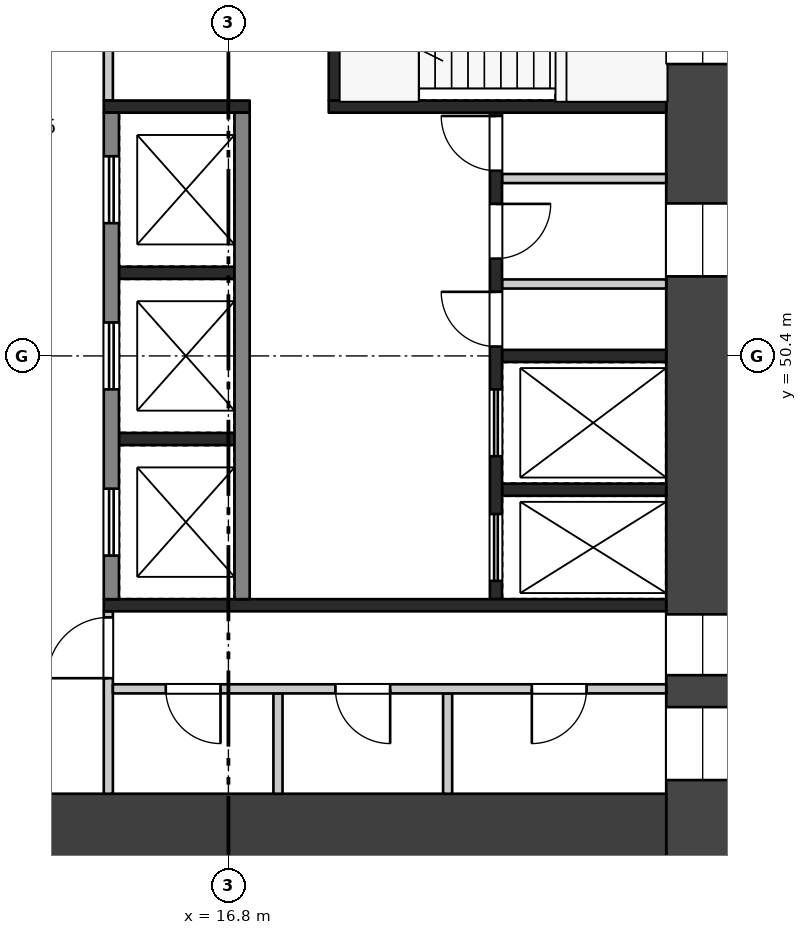
"""IFC4 building model, lengths in metres.
Left out: names, types, materials, properties, quantities, classifications, styles, units other than length and angle.
Written with IfcOpenShell. Run it as: python <this file> out.ifc"""

import sys

from ifc_helpers import new_model, si_unit, direction, frame, frame_2d, origin, place, context, subcontext, project, spatial, rectangle, extrude, element, fill, save


model = new_model("IFC4")
c1 = context("Model", 3, precision=1e-05, world=origin(), true_north=direction((0.0, 1.0)))
c2 = subcontext(c1, "Body", "Model", "MODEL_VIEW")
j1 = project(units=[si_unit("LENGTHUNIT", "METRE"), si_unit("PLANEANGLEUNIT", "RADIAN")], contexts=[c1])
p1 = place(None, origin())
s1 = spatial("IfcSite", under=j1, at=p1, CompositionType="ELEMENT")
p2 = place(p1, origin())
s2 = spatial("IfcBuilding", under=s1, at=p2, CompositionType="ELEMENT")
p3 = place(p2, frame((0.0, 0.0, 207.2)))
s3 = spatial("IfcBuildingStorey", under=s2, at=p3, CompositionType="ELEMENT", Elevation=207.2)
p4 = place(p3, frame((24.6, 58.8, 0.0), z_axis=(0.0, 0.0, 1.0), x_axis=(0.0, -1.0, 0.0)))
e1 = element("IfcWall", 1, at=p4, inside=s3, PredefinedType="SHEAR", context=c2, shape_type="SweptSolid", body=[
    extrude(rectangle(XDim=16.8, YDim=1.2, at=frame_2d((8.4, 0.0))), origin(), (0.0, 0.0, 1.0), 6.72),
])
p5 = place(p4, frame((1.8, 0.0, 0.5)))
e2 = element("IfcOpeningElement", 2, at=p5, cuts=e1, PredefinedType="OPENING", context=c2, shape_type="SweptSolid", body=[
    extrude(rectangle(XDim=1.8, YDim=2.4, at=frame_2d((0.9, 1.2))), frame((0.0, 0.61, 0.0), z_axis=(0.0, -1.0, 0.0), x_axis=(1.0, 0.0, 0.0)), (0.0, 0.0, 1.0), 1.22),
])
p6 = place(p4, frame((5.892, 0.0, 1.6)))
e3 = element("IfcOpeningElement", 3, at=p6, cuts=e1, PredefinedType="OPENING", context=c2, shape_type="SweptSolid", body=[
    extrude(rectangle(XDim=1.2, YDim=1.2, at=frame_2d((0.6, 0.6))), frame((0.0, 0.61, 0.0), z_axis=(0.0, -1.0, 0.0), x_axis=(1.0, 0.0, 0.0)), (0.0, 0.0, 1.0), 1.22),
])
p7 = place(p4, frame((12.65, 0.0, 0.6)))
e4 = element("IfcOpeningElement", 4, at=p7, cuts=e1, PredefinedType="OPENING", context=c2, shape_type="SweptSolid", body=[
    extrude(rectangle(XDim=1.0, YDim=2.1, at=frame_2d((0.5, 1.05))), frame((0.0, 0.61, 0.0), z_axis=(0.0, -1.0, 0.0), x_axis=(1.0, 0.0, 0.0)), (0.0, 0.0, 1.0), 1.22),
])
p8 = place(p4, frame((14.175, 0.0, 1.6)))
e5 = element("IfcOpeningElement", 5, at=p8, cuts=e1, PredefinedType="OPENING", context=c2, shape_type="SweptSolid", body=[
    extrude(rectangle(XDim=1.2, YDim=1.2, at=frame_2d((0.6, 0.6))), frame((0.0, 0.61, 0.0), z_axis=(0.0, -1.0, 0.0), x_axis=(1.0, 0.0, 0.0)), (0.0, 0.0, 1.0), 1.22),
])
p9 = place(p3, frame((9.6, 42.6, 0.0), z_axis=(0.0, 0.0, 1.0), x_axis=(1.0, 0.0, 0.0)))
e6 = element("IfcWall", 6, at=p9, inside=s3, PredefinedType="SHEAR", context=c2, shape_type="SweptSolid", body=[
    extrude(rectangle(XDim=14.4, YDim=1.2, at=frame_2d((7.2, 0.0))), origin(), (0.0, 0.0, 1.0), 6.72),
])
p10 = place(p9, frame((2.1, 0.0, 0.0)))
e7 = element("IfcOpeningElement", 7, at=p10, cuts=e6, PredefinedType="OPENING", context=c2, shape_type="SweptSolid", body=[
    extrude(rectangle(XDim=1.8, YDim=2.1, at=frame_2d((0.9, 1.05))), frame((0.0, 0.61, 0.0), z_axis=(0.0, -1.0, 0.0), x_axis=(1.0, 0.0, 0.0)), (0.0, 0.0, 1.0), 1.22),
])
for number, where, z_axis, x_axis in (
    (8, (15.0, 51.767, 0.0), (0.0, 0.0, 1.0), (1.0, 0.0, 0.0)),
    (9, (15.0, 49.033, 0.0), (0.0, 0.0, 1.0), (1.0, 0.0, 0.0)),
):
    element("IfcWall", number, at=place(p3, frame(where, z_axis=z_axis, x_axis=x_axis)), inside=s3, PredefinedType="SHEAR", context=c2, shape_type="SweptSolid", body=[
        extrude(rectangle(XDim=1.9, YDim=0.2, at=frame_2d((0.95, 0.0))), origin(), (0.0, 0.0, 1.0), 6.72),
    ])
p11 = place(p3, frame((14.875, 54.4, 0.0), z_axis=(0.0, 0.0, 1.0), x_axis=(0.0, -1.0, 0.0)))
e10 = element("IfcWall", 10, at=p11, inside=s3, PredefinedType="SHEAR", context=c2, shape_type="SweptSolid", body=[
    extrude(rectangle(XDim=8.0, YDim=0.25, at=frame_2d((4.0, 0.0))), origin(), (0.0, 0.0, 1.0), 6.72),
])
p12 = place(p11, frame((0.717, 0.0, 0.0)))
e11 = element("IfcOpeningElement", 11, at=p12, cuts=e10, PredefinedType="OPENING", context=c2, shape_type="SweptSolid", body=[
    extrude(rectangle(XDim=1.1, YDim=2.1, at=frame_2d((0.55, 1.05))), frame((0.0, 0.135, 0.0), z_axis=(0.0, -1.0, 0.0), x_axis=(1.0, 0.0, 0.0)), (0.0, 0.0, 1.0), 0.27),
])
p13 = place(p11, frame((3.45, 0.0, 0.0)))
e12 = element("IfcOpeningElement", 12, at=p13, cuts=e10, PredefinedType="OPENING", context=c2, shape_type="SweptSolid", body=[
    extrude(rectangle(XDim=1.1, YDim=2.1, at=frame_2d((0.55, 1.05))), frame((0.0, 0.135, 0.0), z_axis=(0.0, -1.0, 0.0), x_axis=(1.0, 0.0, 0.0)), (0.0, 0.0, 1.0), 0.27),
])
p14 = place(p11, frame((6.183, 0.0, 0.0)))
e13 = element("IfcOpeningElement", 13, at=p14, cuts=e10, PredefinedType="OPENING", context=c2, shape_type="SweptSolid", body=[
    extrude(rectangle(XDim=1.1, YDim=2.1, at=frame_2d((0.55, 1.05))), frame((0.0, 0.135, 0.0), z_axis=(0.0, -1.0, 0.0), x_axis=(1.0, 0.0, 0.0)), (0.0, 0.0, 1.0), 0.27),
])
p15 = place(p3, frame((17.025, 54.4, 0.0), z_axis=(0.0, 0.0, 1.0), x_axis=(0.0, -1.0, 0.0)))
e14 = element("IfcWall", 14, at=p15, inside=s3, PredefinedType="SHEAR", context=c2, shape_type="SweptSolid", body=[
    extrude(rectangle(XDim=8.0, YDim=0.25, at=frame_2d((4.0, 0.0))), origin(), (0.0, 0.0, 1.0), 6.72),
])
for number, where, z_axis, x_axis in (
    (15, (21.3, 50.4, 0.0), (0.0, 0.0, 1.0), (1.0, 0.0, 0.0)),
    (16, (21.3, 48.2, 0.0), (0.0, 0.0, 1.0), (1.0, 0.0, 0.0)),
):
    element("IfcWall", number, at=place(p3, frame(where, z_axis=z_axis, x_axis=x_axis)), inside=s3, PredefinedType="SHEAR", context=c2, shape_type="SweptSolid", body=[
        extrude(rectangle(XDim=2.7, YDim=0.2, at=frame_2d((1.35, 0.0))), origin(), (0.0, 0.0, 1.0), 6.72),
    ])
for number, where, z_axis, x_axis in (
    (17, (21.3, 53.317, 0.0), (0.0, 0.0, 1.0), (1.0, 0.0, 0.0)),
    (18, (21.3, 51.583, 0.0), (0.0, 0.0, 1.0), (1.0, 0.0, 0.0)),
):
    element("IfcWall", number, at=place(p3, frame(where, z_axis=z_axis, x_axis=x_axis)), inside=s3, PredefinedType="PARTITIONING", context=c2, shape_type="SweptSolid", body=[
        extrude(rectangle(XDim=2.7, YDim=0.15, at=frame_2d((1.35, 0.0))), origin(), (0.0, 0.0, 1.0), 6.72),
    ])
p16 = place(p3, frame((21.2, 54.4, 0.0), z_axis=(0.0, 0.0, 1.0), x_axis=(0.0, -1.0, 0.0)))
e19 = element("IfcWall", 19, at=p16, inside=s3, PredefinedType="SHEAR", context=c2, shape_type="SweptSolid", body=[
    extrude(rectangle(XDim=8.0, YDim=0.2, at=frame_2d((4.0, 0.0))), origin(), (0.0, 0.0, 1.0), 6.72),
])
p17 = place(p16, frame((0.054, 0.0, 0.0)))
e20 = element("IfcOpeningElement", 20, at=p17, cuts=e19, PredefinedType="OPENING", context=c2, shape_type="SweptSolid", body=[
    extrude(rectangle(XDim=0.9, YDim=2.1, at=frame_2d((0.45, 1.05))), frame((0.0, 0.11, 0.0), z_axis=(0.0, -1.0, 0.0), x_axis=(1.0, 0.0, 0.0)), (0.0, 0.0, 1.0), 0.22),
])
p18 = place(p16, frame((1.5, 0.0, 0.0)))
e21 = element("IfcOpeningElement", 21, at=p18, cuts=e19, PredefinedType="OPENING", context=c2, shape_type="SweptSolid", body=[
    extrude(rectangle(XDim=0.9, YDim=2.1, at=frame_2d((0.45, 1.05))), frame((0.0, 0.11, 0.0), z_axis=(0.0, -1.0, 0.0), x_axis=(1.0, 0.0, 0.0)), (0.0, 0.0, 1.0), 0.22),
])
p19 = place(p16, frame((2.946, 0.0, 0.0)))
e22 = element("IfcOpeningElement", 22, at=p19, cuts=e19, PredefinedType="OPENING", context=c2, shape_type="SweptSolid", body=[
    extrude(rectangle(XDim=0.9, YDim=2.1, at=frame_2d((0.45, 1.05))), frame((0.0, 0.11, 0.0), z_axis=(0.0, -1.0, 0.0), x_axis=(1.0, 0.0, 0.0)), (0.0, 0.0, 1.0), 0.22),
])
p20 = place(p16, frame((4.55, 0.0, 0.0)))
e23 = element("IfcOpeningElement", 23, at=p20, cuts=e19, PredefinedType="OPENING", context=c2, shape_type="SweptSolid", body=[
    extrude(rectangle(XDim=1.1, YDim=2.1, at=frame_2d((0.55, 1.05))), frame((0.0, 0.11, 0.0), z_axis=(0.0, -1.0, 0.0), x_axis=(1.0, 0.0, 0.0)), (0.0, 0.0, 1.0), 0.22),
])
p21 = place(p16, frame((6.6, 0.0, 0.0)))
e24 = element("IfcOpeningElement", 24, at=p21, cuts=e19, PredefinedType="OPENING", context=c2, shape_type="SweptSolid", body=[
    extrude(rectangle(XDim=1.1, YDim=2.1, at=frame_2d((0.55, 1.05))), frame((0.0, 0.11, 0.0), z_axis=(0.0, -1.0, 0.0), x_axis=(1.0, 0.0, 0.0)), (0.0, 0.0, 1.0), 0.22),
])
p22 = place(p3, frame((14.75, 54.5, 0.0), z_axis=(0.0, 0.0, 1.0), x_axis=(1.0, 0.0, 0.0)))
e25 = element("IfcWall", 25, at=p22, inside=s3, PredefinedType="SHEAR", context=c2, shape_type="SweptSolid", body=[
    extrude(rectangle(XDim=2.4, YDim=0.2, at=frame_2d((1.2, 0.0))), origin(), (0.0, 0.0, 1.0), 6.72),
])
p23 = place(p3, frame((18.45, 54.5, 0.0), z_axis=(0.0, 0.0, 1.0), x_axis=(1.0, 0.0, 0.0)))
e26 = element("IfcWall", 26, at=p23, inside=s3, PredefinedType="SHEAR", context=c2, shape_type="SweptSolid", body=[
    extrude(rectangle(XDim=5.55, YDim=0.2, at=frame_2d((2.775, 0.0))), origin(), (0.0, 0.0, 1.0), 6.72),
])
p24 = place(p3, frame((14.825, 57.6, 0.0), z_axis=(0.0, 0.0, 1.0), x_axis=(0.0, -1.0, 0.0)))
e27 = element("IfcWall", 27, at=p24, inside=s3, PredefinedType="PARTITIONING", context=c2, shape_type="SweptSolid", body=[
    extrude(rectangle(XDim=3.0, YDim=0.15, at=frame_2d((1.5, 0.0))), origin(), (0.0, 0.0, 1.0), 6.72),
])
p25 = place(p24, frame((1.0, 0.0, 0.0)))
e28 = element("IfcOpeningElement", 28, at=p25, cuts=e27, PredefinedType="OPENING", context=c2, shape_type="SweptSolid", body=[
    extrude(rectangle(XDim=1.0, YDim=2.1, at=frame_2d((0.5, 1.05))), frame((0.0, 0.085, 0.0), z_axis=(0.0, -1.0, 0.0), x_axis=(1.0, 0.0, 0.0)), (0.0, 0.0, 1.0), 0.17),
])
p26 = place(p3, frame((18.55, 57.6, 0.0), z_axis=(0.0, 0.0, 1.0), x_axis=(0.0, -1.0, 0.0)))
e29 = element("IfcWall", 29, at=p26, inside=s3, PredefinedType="SHEAR", context=c2, shape_type="SweptSolid", body=[
    extrude(rectangle(XDim=3.0, YDim=0.2, at=frame_2d((1.5, 0.0))), origin(), (0.0, 0.0, 1.0), 6.72),
])
p27 = place(p26, frame((1.0, 0.0, 0.0)))
e30 = element("IfcOpeningElement", 30, at=p27, cuts=e29, PredefinedType="OPENING", context=c2, shape_type="SweptSolid", body=[
    extrude(rectangle(XDim=1.0, YDim=2.1, at=frame_2d((0.5, 1.05))), frame((0.0, 0.11, 0.0), z_axis=(0.0, -1.0, 0.0), x_axis=(1.0, 0.0, 0.0)), (0.0, 0.0, 1.0), 0.22),
])
p28 = place(p3, frame((14.75, 46.3, 0.0), z_axis=(0.0, 0.0, 1.0), x_axis=(1.0, 0.0, 0.0)))
e31 = element("IfcWall", 31, at=p28, inside=s3, PredefinedType="SHEAR", context=c2, shape_type="SweptSolid", body=[
    extrude(rectangle(XDim=9.25, YDim=0.2, at=frame_2d((4.625, 0.0))), origin(), (0.0, 0.0, 1.0), 6.72),
])
p29 = place(p3, frame((14.825, 46.2, 0.0), z_axis=(0.0, 0.0, 1.0), x_axis=(0.0, -1.0, 0.0)))
e32 = element("IfcWall", 32, at=p29, inside=s3, PredefinedType="PARTITIONING", context=c2, shape_type="SweptSolid", body=[
    extrude(rectangle(XDim=3.0, YDim=0.15, at=frame_2d((1.5, 0.0))), origin(), (0.0, 0.0, 1.0), 6.72),
])
p30 = place(p29, frame((0.1, 0.0, 0.0)))
e33 = element("IfcOpeningElement", 33, at=p30, cuts=e32, PredefinedType="OPENING", context=c2, shape_type="SweptSolid", body=[
    extrude(rectangle(XDim=1.0, YDim=2.1, at=frame_2d((0.5, 1.05))), frame((0.0, 0.085, 0.0), z_axis=(0.0, -1.0, 0.0), x_axis=(1.0, 0.0, 0.0)), (0.0, 0.0, 1.0), 0.17),
])
for number, where, z_axis, x_axis in (
    (34, (17.615, 44.85, 0.0), (0.0, 0.0, 1.0), (0.0, -1.0, 0.0)),
    (35, (20.405, 44.85, 0.0), (0.0, 0.0, 1.0), (0.0, -1.0, 0.0)),
):
    element("IfcWall", number, at=place(p3, frame(where, z_axis=z_axis, x_axis=x_axis)), inside=s3, PredefinedType="PARTITIONING", context=c2, shape_type="SweptSolid", body=[
        extrude(rectangle(XDim=1.65, YDim=0.15, at=frame_2d((0.825, 0.0))), origin(), (0.0, 0.0, 1.0), 6.72),
    ])
p31 = place(p3, frame((14.9, 44.925, 0.0), z_axis=(0.0, 0.0, 1.0), x_axis=(1.0, 0.0, 0.0)))
e36 = element("IfcWall", 36, at=p31, inside=s3, PredefinedType="PARTITIONING", context=c2, shape_type="SweptSolid", body=[
    extrude(rectangle(XDim=9.1, YDim=0.15, at=frame_2d((4.55, 0.0))), origin(), (0.0, 0.0, 1.0), 6.72),
])
p32 = place(p31, frame((0.87, 0.0, 0.0)))
e37 = element("IfcOpeningElement", 37, at=p32, cuts=e36, PredefinedType="OPENING", context=c2, shape_type="SweptSolid", body=[
    extrude(rectangle(XDim=0.9, YDim=2.1, at=frame_2d((0.45, 1.05))), frame((0.0, 0.085, 0.0), z_axis=(0.0, -1.0, 0.0), x_axis=(1.0, 0.0, 0.0)), (0.0, 0.0, 1.0), 0.17),
])
p33 = place(p31, frame((3.66, 0.0, 0.0)))
e38 = element("IfcOpeningElement", 38, at=p33, cuts=e36, PredefinedType="OPENING", context=c2, shape_type="SweptSolid", body=[
    extrude(rectangle(XDim=0.9, YDim=2.1, at=frame_2d((0.45, 1.05))), frame((0.0, 0.085, 0.0), z_axis=(0.0, -1.0, 0.0), x_axis=(1.0, 0.0, 0.0)), (0.0, 0.0, 1.0), 0.17),
])
p34 = place(p31, frame((6.89, 0.0, 0.0)))
e39 = element("IfcOpeningElement", 39, at=p34, cuts=e36, PredefinedType="OPENING", context=c2, shape_type="SweptSolid", body=[
    extrude(rectangle(XDim=0.9, YDim=2.1, at=frame_2d((0.45, 1.05))), frame((0.0, 0.085, 0.0), z_axis=(0.0, -1.0, 0.0), x_axis=(1.0, 0.0, 0.0)), (0.0, 0.0, 1.0), 0.17),
])
p35 = place(p12, origin())
e40 = element("IfcDoor", 40, at=p35, inside=s3, OperationType="DOUBLE_DOOR_SLIDING", PredefinedType="DOOR", context=c2, shape_type="SweptSolid", body=[
    extrude(rectangle(XDim=1.1, YDim=2.1, at=frame_2d((0.55, 1.05))), frame((0.0, 0.025, 0.0), z_axis=(0.0, -1.0, 0.0), x_axis=(1.0, 0.0, 0.0)), (0.0, 0.0, 1.0), 0.05),
])
fill(e11, e40)
p36 = place(p13, origin())
e41 = element("IfcDoor", 41, at=p36, inside=s3, OperationType="DOUBLE_DOOR_SLIDING", PredefinedType="DOOR", context=c2, shape_type="SweptSolid", body=[
    extrude(rectangle(XDim=1.1, YDim=2.1, at=frame_2d((0.55, 1.05))), frame((0.0, 0.025, 0.0), z_axis=(0.0, -1.0, 0.0), x_axis=(1.0, 0.0, 0.0)), (0.0, 0.0, 1.0), 0.05),
])
fill(e12, e41)
p37 = place(p14, origin())
e42 = element("IfcDoor", 42, at=p37, inside=s3, OperationType="DOUBLE_DOOR_SLIDING", PredefinedType="DOOR", context=c2, shape_type="SweptSolid", body=[
    extrude(rectangle(XDim=1.1, YDim=2.1, at=frame_2d((0.55, 1.05))), frame((0.0, 0.025, 0.0), z_axis=(0.0, -1.0, 0.0), x_axis=(1.0, 0.0, 0.0)), (0.0, 0.0, 1.0), 0.05),
])
fill(e13, e42)
p38 = place(p17, frame((0.9, 0.0, 0.0), z_axis=(0.0, 0.0, 1.0), x_axis=(-1.0, 0.0, 0.0)))
e43 = element("IfcDoor", 43, at=p38, inside=s3, OperationType="SINGLE_SWING_RIGHT", PredefinedType="DOOR", context=c2, shape_type="SweptSolid", body=[
    extrude(rectangle(XDim=0.9, YDim=2.1, at=frame_2d((0.45, 1.05))), frame((0.0, 0.025, 0.0), z_axis=(0.0, -1.0, 0.0), x_axis=(1.0, 0.0, 0.0)), (0.0, 0.0, 1.0), 0.05),
])
fill(e20, e43)
p39 = place(p18, origin())
e44 = element("IfcDoor", 44, at=p39, inside=s3, OperationType="SINGLE_SWING_LEFT", PredefinedType="DOOR", context=c2, shape_type="SweptSolid", body=[
    extrude(rectangle(XDim=0.9, YDim=2.1, at=frame_2d((0.45, 1.05))), frame((0.0, 0.025, 0.0), z_axis=(0.0, -1.0, 0.0), x_axis=(1.0, 0.0, 0.0)), (0.0, 0.0, 1.0), 0.05),
])
fill(e21, e44)
p40 = place(p19, frame((0.9, 0.0, 0.0), z_axis=(0.0, 0.0, 1.0), x_axis=(-1.0, 0.0, 0.0)))
e45 = element("IfcDoor", 45, at=p40, inside=s3, OperationType="SINGLE_SWING_RIGHT", PredefinedType="DOOR", context=c2, shape_type="SweptSolid", body=[
    extrude(rectangle(XDim=0.9, YDim=2.1, at=frame_2d((0.45, 1.05))), frame((0.0, 0.025, 0.0), z_axis=(0.0, -1.0, 0.0), x_axis=(1.0, 0.0, 0.0)), (0.0, 0.0, 1.0), 0.05),
])
fill(e22, e45)
p41 = place(p20, origin())
e46 = element("IfcDoor", 46, at=p41, inside=s3, OperationType="DOUBLE_DOOR_SLIDING", PredefinedType="DOOR", context=c2, shape_type="SweptSolid", body=[
    extrude(rectangle(XDim=1.1, YDim=2.1, at=frame_2d((0.55, 1.05))), frame((0.0, 0.025, 0.0), z_axis=(0.0, -1.0, 0.0), x_axis=(1.0, 0.0, 0.0)), (0.0, 0.0, 1.0), 0.05),
])
fill(e23, e46)
p42 = place(p21, origin())
e47 = element("IfcDoor", 47, at=p42, inside=s3, OperationType="DOUBLE_DOOR_SLIDING", PredefinedType="DOOR", context=c2, shape_type="SweptSolid", body=[
    extrude(rectangle(XDim=1.1, YDim=2.1, at=frame_2d((0.55, 1.05))), frame((0.0, 0.025, 0.0), z_axis=(0.0, -1.0, 0.0), x_axis=(1.0, 0.0, 0.0)), (0.0, 0.0, 1.0), 0.05),
])
fill(e24, e47)
p43 = place(p30, frame((1.0, 0.0, 0.0), z_axis=(0.0, 0.0, 1.0), x_axis=(-1.0, 0.0, 0.0)))
e48 = element("IfcDoor", 48, at=p43, inside=s3, OperationType="SINGLE_SWING_LEFT", PredefinedType="DOOR", context=c2, shape_type="SweptSolid", body=[
    extrude(rectangle(XDim=1.0, YDim=2.1, at=frame_2d((0.5, 1.05))), frame((0.0, 0.025, 0.0), z_axis=(0.0, -1.0, 0.0), x_axis=(1.0, 0.0, 0.0)), (0.0, 0.0, 1.0), 0.05),
])
fill(e33, e48)
p44 = place(p32, frame((0.9, 0.0, 0.0), z_axis=(0.0, 0.0, 1.0), x_axis=(-1.0, 0.0, 0.0)))
e49 = element("IfcDoor", 49, at=p44, inside=s3, OperationType="SINGLE_SWING_LEFT", PredefinedType="DOOR", context=c2, shape_type="SweptSolid", body=[
    extrude(rectangle(XDim=0.9, YDim=2.1, at=frame_2d((0.45, 1.05))), frame((0.0, 0.025, 0.0), z_axis=(0.0, -1.0, 0.0), x_axis=(1.0, 0.0, 0.0)), (0.0, 0.0, 1.0), 0.05),
])
fill(e37, e49)
p45 = place(p33, frame((0.9, 0.0, 0.0), z_axis=(0.0, 0.0, 1.0), x_axis=(-1.0, 0.0, 0.0)))
e50 = element("IfcDoor", 50, at=p45, inside=s3, OperationType="SINGLE_SWING_LEFT", PredefinedType="DOOR", context=c2, shape_type="SweptSolid", body=[
    extrude(rectangle(XDim=0.9, YDim=2.1, at=frame_2d((0.45, 1.05))), frame((0.0, 0.025, 0.0), z_axis=(0.0, -1.0, 0.0), x_axis=(1.0, 0.0, 0.0)), (0.0, 0.0, 1.0), 0.05),
])
fill(e38, e50)
p46 = place(p34, frame((0.9, 0.0, 0.0), z_axis=(0.0, 0.0, 1.0), x_axis=(-1.0, 0.0, 0.0)))
e51 = element("IfcDoor", 51, at=p46, inside=s3, OperationType="SINGLE_SWING_RIGHT", PredefinedType="DOOR", context=c2, shape_type="SweptSolid", body=[
    extrude(rectangle(XDim=0.9, YDim=2.1, at=frame_2d((0.45, 1.05))), frame((0.0, 0.025, 0.0), z_axis=(0.0, -1.0, 0.0), x_axis=(1.0, 0.0, 0.0)), (0.0, 0.0, 1.0), 0.05),
])
fill(e39, e51)
p47 = place(p5, origin())
e52 = element("IfcWindow", 52, at=p47, inside=s3, PartitioningType="SINGLE_PANEL", PredefinedType="WINDOW", context=c2, shape_type="SweptSolid", body=[
    extrude(rectangle(XDim=1.8, YDim=2.4, at=frame_2d((0.9, 1.2))), frame((0.0, 0.03, 0.0), z_axis=(0.0, -1.0, 0.0), x_axis=(1.0, 0.0, 0.0)), (0.0, 0.0, 1.0), 0.06),
])
fill(e2, e52)
p48 = place(p6, origin())
e53 = element("IfcWindow", 53, at=p48, inside=s3, PartitioningType="SINGLE_PANEL", PredefinedType="WINDOW", context=c2, shape_type="SweptSolid", body=[
    extrude(rectangle(XDim=1.2, YDim=1.2, at=frame_2d((0.6, 0.6))), frame((0.0, 0.03, 0.0), z_axis=(0.0, -1.0, 0.0), x_axis=(1.0, 0.0, 0.0)), (0.0, 0.0, 1.0), 0.06),
])
fill(e3, e53)
p49 = place(p7, origin())
e54 = element("IfcWindow", 54, at=p49, inside=s3, PartitioningType="SINGLE_PANEL", PredefinedType="WINDOW", context=c2, shape_type="SweptSolid", body=[
    extrude(rectangle(XDim=1.0, YDim=2.1, at=frame_2d((0.5, 1.05))), frame((0.0, 0.03, 0.0), z_axis=(0.0, -1.0, 0.0), x_axis=(1.0, 0.0, 0.0)), (0.0, 0.0, 1.0), 0.06),
])
fill(e4, e54)
p50 = place(p8, origin())
e55 = element("IfcWindow", 55, at=p50, inside=s3, PartitioningType="SINGLE_PANEL", PredefinedType="WINDOW", context=c2, shape_type="SweptSolid", body=[
    extrude(rectangle(XDim=1.2, YDim=1.2, at=frame_2d((0.6, 0.6))), frame((0.0, 0.03, 0.0), z_axis=(0.0, -1.0, 0.0), x_axis=(1.0, 0.0, 0.0)), (0.0, 0.0, 1.0), 0.06),
])
fill(e5, e55)
save(model, sys.argv[1])
